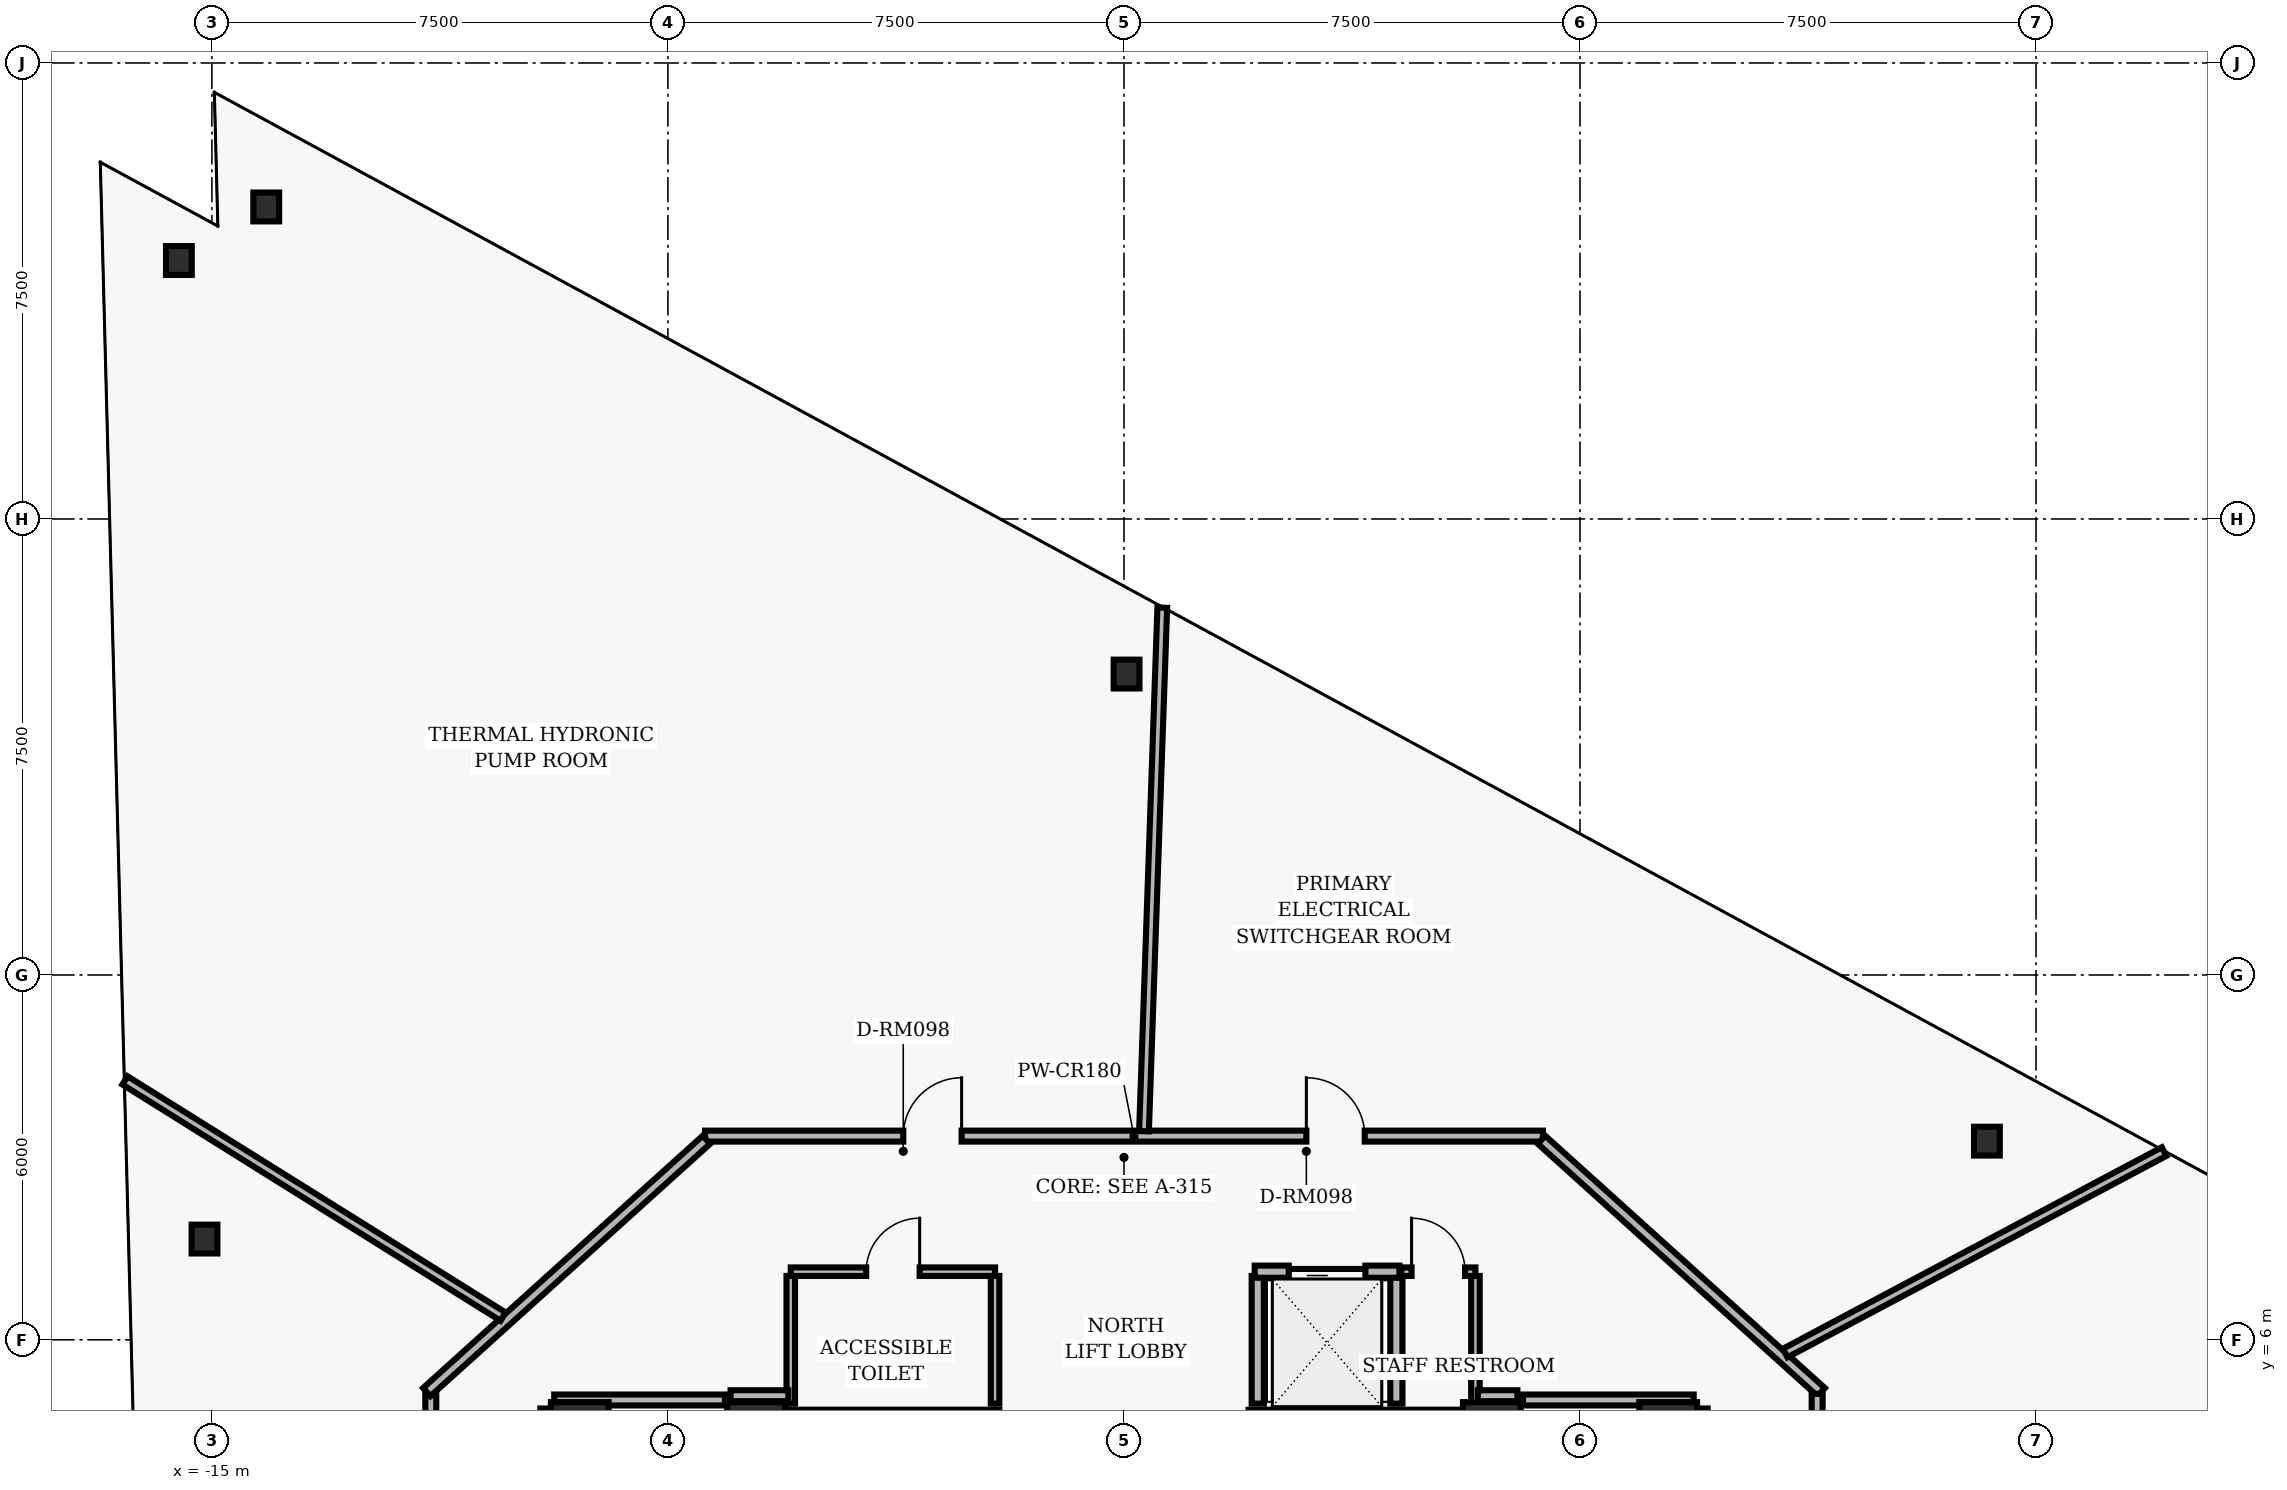
"""IFC4 building model, lengths in metres.
Left out: names, types, materials, properties, quantities, classifications, styles, units other than length and angle.
Written with IfcOpenShell. Run it as: python <this file> out.ifc"""

import sys

from ifc_helpers import new_model, si_unit, direction, frame, frame_2d, origin, origin_2d, place, context, subcontext, project, spatial, rectangle, hollow_rectangle, i_section, extrude, element, fill, save


model = new_model("IFC4")
c1 = context("Model", 3, precision=1e-05, world=origin(), true_north=direction((0.0, 1.0)))
c2 = subcontext(c1, "Body", "Model", "MODEL_VIEW")
j1 = project(units=[si_unit("LENGTHUNIT", "METRE"), si_unit("PLANEANGLEUNIT", "RADIAN")], contexts=[c1])
p1 = place(None, origin())
s1 = spatial("IfcSite", under=j1, at=p1, CompositionType="ELEMENT")
p2 = place(p1, origin())
s2 = spatial("IfcBuilding", under=s1, at=p2, CompositionType="ELEMENT")
p3 = place(p2, frame((0.0, 0.0, 45.76)))
s3 = spatial("IfcBuildingStorey", under=s2, at=p3, CompositionType="ELEMENT", Elevation=45.76)
for number, where, z_axis, x_axis in (
    (1, (-6.05, 4.5, 0.0), (0.0, 0.0, 1.0), (1.0, 0.0, 0.0)),
    (2, (6.05, 4.5, 0.0), (0.0, 0.0, 1.0), (1.0, 0.0, 0.0)),
    (3, (-8.95, 4.5, 0.0), (0.0, 0.0, 1.0), (1.0, 0.0, 0.0)),
    (4, (8.95, 4.5, 0.0), (0.0, 0.0, 1.0), (1.0, 0.0, 0.0)),
):
    element("IfcColumn", number, at=place(p3, frame(where, z_axis=z_axis, x_axis=x_axis)), inside=s3, PredefinedType="COLUMN", context=c2, shape_type="SweptSolid", body=[
        extrude(hollow_rectangle(XDim=0.95, YDim=0.95, WallThickness=0.06, InnerFilletRadius=0.02, OuterFilletRadius=0.04, at=origin_2d()), origin(), (0.0, 0.0, 1.0), 3.84),
    ])
for number, where, z_axis, x_axis in (
    (5, (-5.575, 4.5, 0.0), (0.0, 0.0, 1.0), (1.0, 0.0, 0.0)),
    (6, (2.05, 4.5, 0.0), (0.0, 0.0, 1.0), (1.0, 0.0, 0.0)),
):
    element("IfcWall", number, at=place(p3, frame(where, z_axis=z_axis, x_axis=x_axis)), inside=s3, PredefinedType="SHEAR", context=c2, shape_type="SweptSolid", body=[
        extrude(rectangle(XDim=3.525, YDim=0.7, at=frame_2d((1.762, 0.0))), origin(), (0.0, 0.0, 1.0), 3.418),
    ])
for number, where, z_axis, x_axis in (
    (7, (14.192, 9.267, 0.0), (0.0, 0.0, 1.0), (1.0, 0.0, 0.0)),
    (8, (0.043, 16.949, 0.0), (0.0, 0.0, 1.0), (1.0, 0.0, 0.0)),
    (9, (-14.106, 24.632, 0.0), (0.0, 0.0, 1.0), (1.0, 0.0, 0.0)),
    (10, (-15.543, 23.751, 0.0), (0.0, 0.0, 1.0), (1.0, 0.0, 0.0)),
    (11, (-15.121, 7.657, 0.0), (0.0, 0.0, 1.0), (1.0, 0.0, 0.0)),
):
    element("IfcColumn", number, at=place(p3, frame(where, z_axis=z_axis, x_axis=x_axis)), inside=s3, PredefinedType="COLUMN", context=c2, shape_type="SweptSolid", body=[
        extrude(i_section(OverallWidth=0.424, OverallDepth=0.474, WebThickness=0.048, FlangeThickness=0.077, FilletRadius=0.025, at=origin_2d()), origin(), (0.0, 0.0, 1.0), 3.84),
    ])
for number, where, z_axis, x_axis in (
    (12, (2.2, 4.95, 0.0), (0.0, 0.0, 1.0), (0.0, 1.0, 0.0)),
    (13, (4.48, 4.95, 0.0), (0.0, 0.0, 1.0), (0.0, 1.0, 0.0)),
):
    element("IfcWall", number, at=place(p3, frame(where, z_axis=z_axis, x_axis=x_axis)), inside=s3, PredefinedType="PARTITIONING", context=c2, shape_type="SweptSolid", body=[
        extrude(rectangle(XDim=2.1, YDim=0.2, at=frame_2d((1.05, 0.0))), origin(), (0.0, 0.0, 1.0), 3.393),
    ])
p4 = place(p3, frame((2.15, 7.12, 0.0), z_axis=(0.0, 0.0, 1.0), x_axis=(1.0, 0.0, 0.0)))
e14 = element("IfcWall", 14, at=p4, inside=s3, PredefinedType="PARTITIONING", context=c2, shape_type="SweptSolid", body=[
    extrude(rectangle(XDim=2.38, YDim=0.2, at=frame_2d((1.19, 0.0))), origin(), (0.0, 0.0, 1.0), 3.393),
])
p5 = place(p4, frame((0.56, 0.0, 0.0)))
e15 = element("IfcOpeningElement", 15, at=p5, cuts=e14, PredefinedType="OPENING", context=c2, shape_type="SweptSolid", body=[
    extrude(rectangle(XDim=1.26, YDim=2.06, at=frame_2d((0.63, 1.03))), frame((0.0, 0.11, 0.0), z_axis=(0.0, -1.0, 0.0), x_axis=(1.0, 0.0, 0.0)), (0.0, 0.0, 1.0), 0.22),
])
for number, where, z_axis, x_axis in (
    (16, (-5.48, 4.95, 0.0), (0.0, 0.0, 1.0), (0.0, 1.0, 0.0)),
    (17, (-2.12, 4.95, 0.0), (0.0, 0.0, 1.0), (0.0, 1.0, 0.0)),
):
    element("IfcWall", number, at=place(p3, frame(where, z_axis=z_axis, x_axis=x_axis)), inside=s3, PredefinedType="PARTITIONING", context=c2, shape_type="SweptSolid", body=[
        extrude(rectangle(XDim=2.1, YDim=0.14, at=frame_2d((1.05, 0.0))), origin(), (0.0, 0.0, 1.0), 3.393),
    ])
p6 = place(p3, frame((-5.48, 7.12, 0.0), z_axis=(0.0, 0.0, 1.0), x_axis=(1.0, 0.0, 0.0)))
e18 = element("IfcWall", 18, at=p6, inside=s3, PredefinedType="PARTITIONING", context=c2, shape_type="SweptSolid", body=[
    extrude(rectangle(XDim=3.36, YDim=0.14, at=frame_2d((1.68, 0.0))), origin(), (0.0, 0.0, 1.0), 3.393),
])
p7 = place(p6, frame((1.24, 0.0, 0.0)))
e19 = element("IfcOpeningElement", 19, at=p7, cuts=e18, PredefinedType="OPENING", context=c2, shape_type="SweptSolid", body=[
    extrude(rectangle(XDim=0.88, YDim=2.02, at=frame_2d((0.44, 1.01))), frame((0.0, 0.08, 0.0), z_axis=(0.0, -1.0, 0.0), x_axis=(1.0, 0.0, 0.0)), (0.0, 0.0, 1.0), 0.16),
])
p8 = place(p3, frame((5.78, 4.95, 0.0), z_axis=(0.0, 0.0, 1.0), x_axis=(0.0, 1.0, 0.0)))
e20 = element("IfcWall", 20, at=p8, inside=s3, PredefinedType="PARTITIONING", context=c2, shape_type="SweptSolid", body=[
    extrude(rectangle(XDim=2.1, YDim=0.14, at=frame_2d((1.05, 0.0))), origin(), (0.0, 0.0, 1.0), 3.393),
])
p9 = place(p3, frame((4.56, 7.12, 0.0), z_axis=(0.0, 0.0, 1.0), x_axis=(1.0, 0.0, 0.0)))
e21 = element("IfcWall", 21, at=p9, inside=s3, PredefinedType="PARTITIONING", context=c2, shape_type="SweptSolid", body=[
    extrude(rectangle(XDim=1.22, YDim=0.14, at=frame_2d((0.61, 0.0))), origin(), (0.0, 0.0, 1.0), 3.393),
])
p10 = place(p9, frame((0.17, 0.0, 0.0)))
e22 = element("IfcOpeningElement", 22, at=p10, cuts=e21, PredefinedType="OPENING", context=c2, shape_type="SweptSolid", body=[
    extrude(rectangle(XDim=0.88, YDim=2.02, at=frame_2d((0.44, 1.01))), frame((0.0, 0.08, 0.0), z_axis=(0.0, -1.0, 0.0), x_axis=(1.0, 0.0, 0.0)), (0.0, 0.0, 1.0), 0.16),
])
p11 = place(p3, frame((-6.89, 9.35, 0.0), z_axis=(0.0, 0.0, 1.0), x_axis=(1.0, 0.0, 0.0)))
e23 = element("IfcWall", 23, at=p11, inside=s3, PredefinedType="PARTITIONING", context=c2, shape_type="SweptSolid", body=[
    extrude(rectangle(XDim=13.78, YDim=0.18, at=frame_2d((6.89, 0.0))), origin(), (0.0, 0.0, 1.0), 2.907),
])
p12 = place(p11, frame((9.889, 0.0, 0.0)))
e24 = element("IfcOpeningElement", 24, at=p12, cuts=e23, PredefinedType="OPENING", context=c2, shape_type="SweptSolid", body=[
    extrude(rectangle(XDim=0.96, YDim=2.02, at=frame_2d((0.48, 1.01))), frame((0.0, 0.1, 0.0), z_axis=(0.0, -1.0, 0.0), x_axis=(1.0, 0.0, 0.0)), (0.0, 0.0, 1.0), 0.2),
])
p13 = place(p11, frame((3.26, 0.0, 0.0)))
e25 = element("IfcOpeningElement", 25, at=p13, cuts=e23, PredefinedType="OPENING", context=c2, shape_type="SweptSolid", body=[
    extrude(rectangle(XDim=0.96, YDim=2.02, at=frame_2d((0.48, 1.01))), frame((0.0, 0.1, 0.0), z_axis=(0.0, -1.0, 0.0), x_axis=(1.0, 0.0, 0.0)), (0.0, 0.0, 1.0), 0.2),
])
p14 = place(p3, frame((6.867, 9.29, 0.0), z_axis=(0.0, 0.0, 1.0), x_axis=(0.742486327971, -0.669861219042, 0.0)))
e26 = element("IfcWall", 26, at=p14, inside=s3, PredefinedType="PARTITIONING", context=c2, shape_type="SweptSolid", body=[
    extrude(rectangle(XDim=6.196, YDim=0.18, at=frame_2d((3.098, 0.0))), origin(), (0.0, 0.0, 1.0), 2.907),
])
p15 = place(p3, frame((11.4, 5.11, 0.0), z_axis=(0.0, 0.0, 1.0), x_axis=(0.0, -1.0, 0.0)))
e27 = element("IfcWall", 27, at=p15, inside=s3, PredefinedType="PARTITIONING", context=c2, shape_type="SweptSolid", body=[
    extrude(rectangle(XDim=10.22, YDim=0.18, at=frame_2d((5.11, 0.0))), origin(), (0.0, 0.0, 1.0), 3.393),
])
p16 = place(p15, frame((4.63, 0.0, 0.0)))
e28 = element("IfcOpeningElement", 28, at=p16, cuts=e27, PredefinedType="OPENING", context=c2, shape_type="SweptSolid", body=[
    extrude(rectangle(XDim=0.96, YDim=2.02, at=frame_2d((0.48, 1.01))), frame((0.0, 0.1, 0.0), z_axis=(0.0, -1.0, 0.0), x_axis=(1.0, 0.0, 0.0)), (0.0, 0.0, 1.0), 0.2),
])
p17 = place(p3, frame((-11.4, -5.11, 0.0), z_axis=(0.0, 0.0, 1.0), x_axis=(0.0, 1.0, 0.0)))
e29 = element("IfcWall", 29, at=p17, inside=s3, PredefinedType="PARTITIONING", context=c2, shape_type="SweptSolid", body=[
    extrude(rectangle(XDim=10.22, YDim=0.18, at=frame_2d((5.11, 0.0))), origin(), (0.0, 0.0, 1.0), 3.393),
])
p18 = place(p17, frame((0.3, 0.0, 0.0)))
e30 = element("IfcOpeningElement", 30, at=p18, cuts=e29, PredefinedType="OPENING", context=c2, shape_type="SweptSolid", body=[
    extrude(rectangle(XDim=0.96, YDim=2.02, at=frame_2d((0.48, 1.01))), frame((0.0, 0.1, 0.0), z_axis=(0.0, -1.0, 0.0), x_axis=(1.0, 0.0, 0.0)), (0.0, 0.0, 1.0), 0.2),
])
p19 = place(p3, frame((-11.467, 5.14, 0.0), z_axis=(0.0, 0.0, 1.0), x_axis=(0.742486327971, 0.669861219042, 0.0)))
e31 = element("IfcWall", 31, at=p19, inside=s3, PredefinedType="PARTITIONING", context=c2, shape_type="SweptSolid", body=[
    extrude(rectangle(XDim=6.196, YDim=0.18, at=frame_2d((3.098, 0.0))), origin(), (0.0, 0.0, 1.0), 3.393),
])
p20 = place(p3, frame((-9.51, 4.87, 0.0), z_axis=(0.0, 0.0, 1.0), x_axis=(0.0, -1.0, 0.0)))
e32 = element("IfcWall", 32, at=p20, inside=s3, PredefinedType="PARTITIONING", context=c2, shape_type="SweptSolid", body=[
    extrude(rectangle(XDim=9.74, YDim=0.18, at=frame_2d((4.87, 0.0))), origin(), (0.0, 0.0, 1.0), 2.6),
])
p21 = place(p3, frame((9.51, -4.87, 0.0), z_axis=(0.0, 0.0, 1.0), x_axis=(0.0, 1.0, 0.0)))
e33 = element("IfcWall", 33, at=p21, inside=s3, PredefinedType="PARTITIONING", context=c2, shape_type="SweptSolid", body=[
    extrude(rectangle(XDim=9.74, YDim=0.18, at=frame_2d((4.87, 0.0))), origin(), (0.0, 0.0, 1.0), 3.393),
])
p22 = place(p3, frame((9.37, 5.01, 0.0), z_axis=(0.0, 0.0, 1.0), x_axis=(-1.0, 0.0, 0.0)))
e34 = element("IfcWall", 34, at=p22, inside=s3, PredefinedType="PARTITIONING", context=c2, shape_type="SweptSolid", body=[
    extrude(rectangle(XDim=2.808, YDim=0.18, at=frame_2d((1.404, 0.0))), origin(), (0.0, 0.0, 1.0), 3.393),
])
p23 = place(p3, frame((6.47, 5.08, 0.0), z_axis=(0.0, 0.0, 1.0), x_axis=(-1.0, 0.0, 0.0)))
e35 = element("IfcWall", 35, at=p23, inside=s3, PredefinedType="PARTITIONING", context=c2, shape_type="SweptSolid", body=[
    extrude(rectangle(XDim=0.65, YDim=0.18, at=frame_2d((0.325, 0.0))), origin(), (0.0, 0.0, 1.0), 3.393),
])
p24 = place(p3, frame((-5.52, 5.08, 0.0), z_axis=(0.0, 0.0, 1.0), x_axis=(-1.0, 0.0, 0.0)))
e36 = element("IfcWall", 36, at=p24, inside=s3, PredefinedType="PARTITIONING", context=c2, shape_type="SweptSolid", body=[
    extrude(rectangle(XDim=0.95, YDim=0.18, at=frame_2d((0.475, 0.0))), origin(), (0.0, 0.0, 1.0), 3.393),
])
p25 = place(p3, frame((-6.562, 5.01, 0.0), z_axis=(0.0, 0.0, 1.0), x_axis=(-1.0, 0.0, 0.0)))
e37 = element("IfcWall", 37, at=p25, inside=s3, PredefinedType="PARTITIONING", context=c2, shape_type="SweptSolid", body=[
    extrude(rectangle(XDim=2.808, YDim=0.18, at=frame_2d((1.404, 0.0))), origin(), (0.0, 0.0, 1.0), 3.393),
])
p26 = place(p3, frame((10.874, 5.782, 0.0), z_axis=(0.0, 0.0, 1.0), x_axis=(0.882939204237, 0.469487339149, 0.0)))
e38 = element("IfcWall", 38, at=p26, inside=s3, PredefinedType="PARTITIONING", context=c2, shape_type="SweptSolid", body=[
    extrude(rectangle(XDim=7.058, YDim=0.16, at=frame_2d((3.529, 0.0))), origin(), (0.0, 0.0, 1.0), 2.6),
])
p27 = place(p3, frame((0.329, 9.43, 0.0), z_axis=(0.0, 0.0, 1.0), x_axis=(0.034877981251, 0.999391578123, 0.0)))
e39 = element("IfcWall", 39, at=p27, inside=s3, PredefinedType="PARTITIONING", context=c2, shape_type="SweptSolid", body=[
    extrude(rectangle(XDim=8.617, YDim=0.16, at=frame_2d((4.308, 0.0))), origin(), (0.0, 0.0, 1.0), 3.393),
])
p28 = place(p3, frame((-10.211, 6.381, 0.0), z_axis=(0.0, 0.0, 1.0), x_axis=(-0.848061887973, 0.529897192073, 0.0)))
e40 = element("IfcWall", 40, at=p28, inside=s3, PredefinedType="PARTITIONING", context=c2, shape_type="SweptSolid", body=[
    extrude(rectangle(XDim=7.333, YDim=0.16, at=frame_2d((3.667, 0.0))), origin(), (0.0, 0.0, 1.0), 3.393),
])
p29 = place(p5, origin())
e41 = element("IfcDoor", 41, at=p29, inside=s3, OperationType="SLIDING_TO_LEFT", PredefinedType="DOOR", context=c2, shape_type="SweptSolid", body=[
    extrude(rectangle(XDim=1.26, YDim=2.06, at=frame_2d((0.63, 1.03))), frame((0.0, 0.025, 0.0), z_axis=(0.0, -1.0, 0.0), x_axis=(1.0, 0.0, 0.0)), (0.0, 0.0, 1.0), 0.05),
])
fill(e15, e41)
p30 = place(p7, origin())
e42 = element("IfcDoor", 42, at=p30, inside=s3, OperationType="SINGLE_SWING_RIGHT", PredefinedType="DOOR", context=c2, shape_type="SweptSolid", body=[
    extrude(rectangle(XDim=0.88, YDim=2.02, at=frame_2d((0.44, 1.01))), frame((0.0, 0.025, 0.0), z_axis=(0.0, -1.0, 0.0), x_axis=(1.0, 0.0, 0.0)), (0.0, 0.0, 1.0), 0.05),
])
fill(e19, e42)
p31 = place(p10, origin())
e43 = element("IfcDoor", 43, at=p31, inside=s3, OperationType="SINGLE_SWING_LEFT", PredefinedType="DOOR", context=c2, shape_type="SweptSolid", body=[
    extrude(rectangle(XDim=0.88, YDim=2.02, at=frame_2d((0.44, 1.01))), frame((0.0, 0.025, 0.0), z_axis=(0.0, -1.0, 0.0), x_axis=(1.0, 0.0, 0.0)), (0.0, 0.0, 1.0), 0.05),
])
fill(e22, e43)
p32 = place(p12, origin())
e44 = element("IfcDoor", 44, at=p32, inside=s3, OperationType="SINGLE_SWING_LEFT", PredefinedType="DOOR", context=c2, shape_type="SweptSolid", body=[
    extrude(rectangle(XDim=0.96, YDim=2.02, at=frame_2d((0.48, 1.01))), frame((0.0, 0.025, 0.0), z_axis=(0.0, -1.0, 0.0), x_axis=(1.0, 0.0, 0.0)), (0.0, 0.0, 1.0), 0.05),
])
fill(e24, e44)
p33 = place(p13, origin())
e45 = element("IfcDoor", 45, at=p33, inside=s3, OperationType="SINGLE_SWING_RIGHT", PredefinedType="DOOR", context=c2, shape_type="SweptSolid", body=[
    extrude(rectangle(XDim=0.96, YDim=2.02, at=frame_2d((0.48, 1.01))), frame((0.0, 0.025, 0.0), z_axis=(0.0, -1.0, 0.0), x_axis=(1.0, 0.0, 0.0)), (0.0, 0.0, 1.0), 0.05),
])
fill(e25, e45)
save(model, sys.argv[1])
